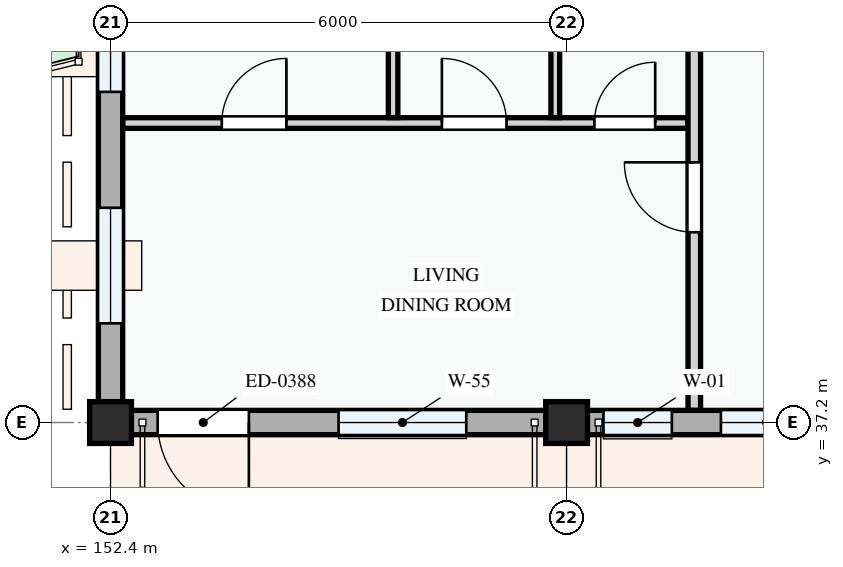
"""IFC4 building model, lengths in metres.
Left out: names, types, materials, properties, quantities, classifications, styles, units other than length and angle.
Written with IfcOpenShell. Run it as: python <this file> out.ifc"""

import sys

from ifc_helpers import new_model, si_unit, direction, frame, frame_2d, origin, origin_2d, place, context, subcontext, project, spatial, rectangle, extrude, element, fill, save


model = new_model("IFC4")
c1 = context("Model", 3, precision=1e-05, world=origin(), true_north=direction((0.0, 1.0)))
c2 = subcontext(c1, "Body", "Model", "MODEL_VIEW")
j1 = project(units=[si_unit("LENGTHUNIT", "METRE"), si_unit("PLANEANGLEUNIT", "RADIAN")], contexts=[c1])
p1 = place(None, origin())
s1 = spatial("IfcSite", under=j1, at=p1, CompositionType="ELEMENT")
p2 = place(p1, origin())
s2 = spatial("IfcBuilding", under=s1, at=p2, CompositionType="ELEMENT")
p3 = place(p2, frame((0.0, 0.0, 11.4)))
s3 = spatial("IfcBuildingStorey", under=s2, at=p3, CompositionType="ELEMENT", Elevation=11.4)
for number, where, z_axis, x_axis in (
    (1, (152.4, 37.2, 0.0), (0.0, 0.0, 1.0), (1.0, 0.0, 0.0)),
    (2, (158.4, 37.2, 0.0), (0.0, 0.0, 1.0), (1.0, 0.0, 0.0)),
):
    element("IfcColumn", number, at=place(p3, frame(where, z_axis=z_axis, x_axis=x_axis)), inside=s3, PredefinedType="COLUMN", context=c2, shape_type="SweptSolid", body=[
        extrude(rectangle(XDim=0.55, YDim=0.55, at=origin_2d()), origin(), (0.0, 0.0, 1.0), 3.3),
    ])
p4 = place(p3, frame((152.4, 43.2, 0.0), z_axis=(0.0, 0.0, 1.0), x_axis=(0.0, -1.0, 0.0)))
e3 = element("IfcWall", 3, at=p4, inside=s3, PredefinedType="STANDARD", context=c2, shape_type="SweptSolid", body=[
    extrude(rectangle(XDim=6.0, YDim=0.32, at=frame_2d((3.0, 0.0))), origin(), (0.0, 0.0, 1.0), 2.575),
])
p5 = place(p4, frame((0.6, 0.0, 0.78)))
e4 = element("IfcOpeningElement", 4, at=p5, cuts=e3, PredefinedType="OPENING", context=c2, shape_type="SweptSolid", body=[
    extrude(rectangle(XDim=1.05, YDim=1.2, at=frame_2d((0.525, 0.6))), frame((0.0, 0.17, 0.0), z_axis=(0.0, -1.0, 0.0), x_axis=(1.0, 0.0, 0.0)), (0.0, 0.0, 1.0), 0.34),
])
p6 = place(p4, frame((3.175, 0.0, 0.78)))
e5 = element("IfcOpeningElement", 5, at=p6, cuts=e3, PredefinedType="OPENING", context=c2, shape_type="SweptSolid", body=[
    extrude(rectangle(XDim=1.52, YDim=1.42, at=frame_2d((0.76, 0.71))), frame((0.0, 0.17, 0.0), z_axis=(0.0, -1.0, 0.0), x_axis=(1.0, 0.0, 0.0)), (0.0, 0.0, 1.0), 0.34),
])
p7 = place(p3, frame((152.4, 37.2, 0.0), z_axis=(0.0, 0.0, 1.0), x_axis=(1.0, 0.0, 0.0)))
e6 = element("IfcWall", 6, at=p7, inside=s3, PredefinedType="STANDARD", context=c2, shape_type="SweptSolid", body=[
    extrude(rectangle(XDim=6.0, YDim=0.32, at=frame_2d((3.0, 0.0))), origin(), (0.0, 0.0, 1.0), 2.475),
])
p8 = place(p7, frame((0.62, 0.0, 0.0)))
e7 = element("IfcOpeningElement", 7, at=p8, cuts=e6, PredefinedType="OPENING", context=c2, shape_type="SweptSolid", body=[
    extrude(rectangle(XDim=1.2, YDim=2.15, at=frame_2d((0.6, 1.075))), frame((0.0, 0.17, 0.0), z_axis=(0.0, -1.0, 0.0), x_axis=(1.0, 0.0, 0.0)), (0.0, 0.0, 1.0), 0.34),
])
p9 = place(p7, frame((3.0, 0.0, 0.78)))
e8 = element("IfcOpeningElement", 8, at=p9, cuts=e6, PredefinedType="OPENING", context=c2, shape_type="SweptSolid", body=[
    extrude(rectangle(XDim=1.68, YDim=1.46, at=frame_2d((0.84, 0.73))), frame((0.0, 0.17, 0.0), z_axis=(0.0, -1.0, 0.0), x_axis=(1.0, 0.0, 0.0)), (0.0, 0.0, 1.0), 0.34),
])
p10 = place(p3, frame((158.4, 37.2, 0.0), z_axis=(0.0, 0.0, 1.0), x_axis=(1.0, 0.0, 0.0)))
e9 = element("IfcWall", 9, at=p10, inside=s3, PredefinedType="STANDARD", context=c2, shape_type="SweptSolid", body=[
    extrude(rectangle(XDim=8.4, YDim=0.32, at=frame_2d((4.2, 0.0))), origin(), (0.0, 0.0, 1.0), 2.375),
])
p11 = place(p10, frame((3.91, 0.0, 0.0)))
e10 = element("IfcOpeningElement", 10, at=p11, cuts=e9, PredefinedType="OPENING", context=c2, shape_type="SweptSolid", body=[
    extrude(rectangle(XDim=1.25, YDim=2.2, at=frame_2d((0.625, 1.1))), frame((0.0, 0.17, 0.0), z_axis=(0.0, -1.0, 0.0), x_axis=(1.0, 0.0, 0.0)), (0.0, 0.0, 1.0), 0.34),
])
p12 = place(p10, frame((0.485, 0.0, 0.78)))
e11 = element("IfcOpeningElement", 11, at=p12, cuts=e9, PredefinedType="OPENING", context=c2, shape_type="SweptSolid", body=[
    extrude(rectangle(XDim=0.9, YDim=1.2, at=frame_2d((0.45, 0.6))), frame((0.0, 0.17, 0.0), z_axis=(0.0, -1.0, 0.0), x_axis=(1.0, 0.0, 0.0)), (0.0, 0.0, 1.0), 0.34),
])
p13 = place(p10, frame((2.03, 0.0, 0.78)))
e12 = element("IfcOpeningElement", 12, at=p13, cuts=e9, PredefinedType="OPENING", context=c2, shape_type="SweptSolid", body=[
    extrude(rectangle(XDim=1.2, YDim=1.35, at=frame_2d((0.6, 0.675))), frame((0.0, 0.17, 0.0), z_axis=(0.0, -1.0, 0.0), x_axis=(1.0, 0.0, 0.0)), (0.0, 0.0, 1.0), 0.34),
])
p14 = place(p10, frame((5.935, 0.0, 0.78)))
e13 = element("IfcOpeningElement", 13, at=p14, cuts=e9, PredefinedType="OPENING", context=c2, shape_type="SweptSolid", body=[
    extrude(rectangle(XDim=1.55, YDim=1.4, at=frame_2d((0.775, 0.7))), frame((0.0, 0.17, 0.0), z_axis=(0.0, -1.0, 0.0), x_axis=(1.0, 0.0, 0.0)), (0.0, 0.0, 1.0), 0.34),
])
p15 = place(p3, frame((152.562, 41.14, 0.0), z_axis=(0.0, 0.0, 1.0), x_axis=(1.0, 0.0, 0.0)))
e14 = element("IfcWall", 14, at=p15, inside=s3, PredefinedType="PARTITIONING", context=c2, shape_type="SweptSolid", body=[
    extrude(rectangle(XDim=7.434, YDim=0.14, at=frame_2d((3.717, 0.0))), origin(), (0.0, 0.0, 1.0), 3.0),
])
p16 = place(p15, frame((1.302, 0.0, 0.0)))
e15 = element("IfcOpeningElement", 15, at=p16, cuts=e14, PredefinedType="OPENING", context=c2, shape_type="SweptSolid", body=[
    extrude(rectangle(XDim=0.85, YDim=2.1, at=frame_2d((0.425, 1.05))), frame((0.0, 0.08, 0.0), z_axis=(0.0, -1.0, 0.0), x_axis=(1.0, 0.0, 0.0)), (0.0, 0.0, 1.0), 0.16),
])
p17 = place(p15, frame((4.198, 0.0, 0.0)))
e16 = element("IfcOpeningElement", 16, at=p17, cuts=e14, PredefinedType="OPENING", context=c2, shape_type="SweptSolid", body=[
    extrude(rectangle(XDim=0.85, YDim=2.1, at=frame_2d((0.425, 1.05))), frame((0.0, 0.08, 0.0), z_axis=(0.0, -1.0, 0.0), x_axis=(1.0, 0.0, 0.0)), (0.0, 0.0, 1.0), 0.16),
])
p18 = place(p15, frame((6.204, 0.0, 0.0)))
e17 = element("IfcOpeningElement", 17, at=p18, cuts=e14, PredefinedType="OPENING", context=c2, shape_type="SweptSolid", body=[
    extrude(rectangle(XDim=0.8, YDim=2.1, at=frame_2d((0.4, 1.05))), frame((0.0, 0.08, 0.0), z_axis=(0.0, -1.0, 0.0), x_axis=(1.0, 0.0, 0.0)), (0.0, 0.0, 1.0), 0.16),
])
p19 = place(p3, frame((156.118, 41.212, 0.0), z_axis=(0.0, 0.0, 1.0), x_axis=(0.0, 1.0, 0.0)))
e18 = element("IfcWall", 18, at=p19, inside=s3, PredefinedType="PARTITIONING", context=c2, shape_type="SweptSolid", body=[
    extrude(rectangle(XDim=3.706, YDim=0.125, at=frame_2d((1.853, 0.0))), origin(), (0.0, 0.0, 1.0), 3.0),
])
p20 = place(p3, frame((158.251, 41.212, 0.0), z_axis=(0.0, 0.0, 1.0), x_axis=(0.0, 1.0, 0.0)))
e19 = element("IfcWall", 19, at=p20, inside=s3, PredefinedType="PARTITIONING", context=c2, shape_type="SweptSolid", body=[
    extrude(rectangle(XDim=3.706, YDim=0.115, at=frame_2d((1.853, 0.0))), origin(), (0.0, 0.0, 1.0), 2.425),
])
p21 = place(p3, frame((160.08, 37.362, 0.0), z_axis=(0.0, 0.0, 1.0), x_axis=(0.0, 1.0, 0.0)))
e20 = element("IfcWall", 20, at=p21, inside=s3, PredefinedType="PARTITIONING", context=c2, shape_type="SweptSolid", body=[
    extrude(rectangle(XDim=20.378, YDim=0.165, at=frame_2d((10.189, 0.0))), origin(), (0.0, 0.0, 1.0), 3.0),
])
p22 = place(p21, frame((2.341, 0.0, 0.0)))
e21 = element("IfcOpeningElement", 21, at=p22, cuts=e20, PredefinedType="OPENING", context=c2, shape_type="SweptSolid", body=[
    extrude(rectangle(XDim=0.92, YDim=2.1, at=frame_2d((0.46, 1.05))), frame((0.0, 0.093, 0.0), z_axis=(0.0, -1.0, 0.0), x_axis=(1.0, 0.0, 0.0)), (0.0, 0.0, 1.0), 0.185),
])
p23 = place(p21, frame((9.608, 0.0, 0.0)))
e22 = element("IfcOpeningElement", 22, at=p23, cuts=e20, PredefinedType="OPENING", context=c2, shape_type="SweptSolid", body=[
    extrude(rectangle(XDim=0.92, YDim=2.1, at=frame_2d((0.46, 1.05))), frame((0.0, 0.093, 0.0), z_axis=(0.0, -1.0, 0.0), x_axis=(1.0, 0.0, 0.0)), (0.0, 0.0, 1.0), 0.185),
])
p24 = place(p5, origin())
e23 = element("IfcWindow", 23, at=p24, inside=s3, PartitioningType="SINGLE_PANEL", PredefinedType="WINDOW", context=c2, shape_type="SweptSolid", body=[
    extrude(rectangle(XDim=1.05, YDim=1.2, at=frame_2d((0.525, 0.6))), frame((0.0, 0.03, 0.0), z_axis=(0.0, -1.0, 0.0), x_axis=(1.0, 0.0, 0.0)), (0.0, 0.0, 1.0), 0.06),
])
fill(e4, e23)
p25 = place(p6, origin())
e24 = element("IfcWindow", 24, at=p25, inside=s3, PartitioningType="SINGLE_PANEL", PredefinedType="WINDOW", context=c2, shape_type="SweptSolid", body=[
    extrude(rectangle(XDim=1.52, YDim=1.42, at=frame_2d((0.76, 0.71))), frame((0.0, 0.03, 0.0), z_axis=(0.0, -1.0, 0.0), x_axis=(1.0, 0.0, 0.0)), (0.0, 0.0, 1.0), 0.06),
])
fill(e5, e24)
p26 = place(p8, frame((1.2, 0.0, 0.0), z_axis=(0.0, 0.0, 1.0), x_axis=(-1.0, 0.0, 0.0)))
e25 = element("IfcDoor", 25, at=p26, inside=s3, OperationType="SINGLE_SWING_LEFT", PredefinedType="DOOR", context=c2, shape_type="SweptSolid", body=[
    extrude(rectangle(XDim=1.2, YDim=2.15, at=frame_2d((0.6, 1.075))), frame((0.0, 0.025, 0.0), z_axis=(0.0, -1.0, 0.0), x_axis=(1.0, 0.0, 0.0)), (0.0, 0.0, 1.0), 0.05),
])
fill(e7, e25)
p27 = place(p9, origin())
e26 = element("IfcWindow", 26, at=p27, inside=s3, PartitioningType="DOUBLE_PANEL_VERTICAL", PredefinedType="WINDOW", context=c2, shape_type="SweptSolid", body=[
    extrude(rectangle(XDim=1.68, YDim=1.46, at=frame_2d((0.84, 0.73))), frame((0.0, 0.03, 0.0), z_axis=(0.0, -1.0, 0.0), x_axis=(1.0, 0.0, 0.0)), (0.0, 0.0, 1.0), 0.06),
])
fill(e8, e26)
p28 = place(p12, origin())
e27 = element("IfcWindow", 27, at=p28, inside=s3, PartitioningType="SINGLE_PANEL", PredefinedType="WINDOW", context=c2, shape_type="SweptSolid", body=[
    extrude(rectangle(XDim=0.9, YDim=1.2, at=frame_2d((0.45, 0.6))), frame((0.0, 0.03, 0.0), z_axis=(0.0, -1.0, 0.0), x_axis=(1.0, 0.0, 0.0)), (0.0, 0.0, 1.0), 0.06),
])
fill(e11, e27)
p29 = place(p13, origin())
e28 = element("IfcWindow", 28, at=p29, inside=s3, PartitioningType="SINGLE_PANEL", PredefinedType="WINDOW", context=c2, shape_type="SweptSolid", body=[
    extrude(rectangle(XDim=1.2, YDim=1.35, at=frame_2d((0.6, 0.675))), frame((0.0, 0.03, 0.0), z_axis=(0.0, -1.0, 0.0), x_axis=(1.0, 0.0, 0.0)), (0.0, 0.0, 1.0), 0.06),
])
fill(e12, e28)
p30 = place(p16, origin())
e29 = element("IfcDoor", 29, at=p30, inside=s3, OperationType="SINGLE_SWING_RIGHT", PredefinedType="DOOR", context=c2, shape_type="SweptSolid", body=[
    extrude(rectangle(XDim=0.85, YDim=2.1, at=frame_2d((0.425, 1.05))), frame((0.0, 0.025, 0.0), z_axis=(0.0, -1.0, 0.0), x_axis=(1.0, 0.0, 0.0)), (0.0, 0.0, 1.0), 0.05),
])
fill(e15, e29)
p31 = place(p17, origin())
e30 = element("IfcDoor", 30, at=p31, inside=s3, OperationType="SINGLE_SWING_LEFT", PredefinedType="DOOR", context=c2, shape_type="SweptSolid", body=[
    extrude(rectangle(XDim=0.85, YDim=2.1, at=frame_2d((0.425, 1.05))), frame((0.0, 0.025, 0.0), z_axis=(0.0, -1.0, 0.0), x_axis=(1.0, 0.0, 0.0)), (0.0, 0.0, 1.0), 0.05),
])
fill(e16, e30)
p32 = place(p18, origin())
e31 = element("IfcDoor", 31, at=p32, inside=s3, OperationType="SINGLE_SWING_RIGHT", PredefinedType="DOOR", context=c2, shape_type="SweptSolid", body=[
    extrude(rectangle(XDim=0.8, YDim=2.1, at=frame_2d((0.4, 1.05))), frame((0.0, 0.025, 0.0), z_axis=(0.0, -1.0, 0.0), x_axis=(1.0, 0.0, 0.0)), (0.0, 0.0, 1.0), 0.05),
])
fill(e17, e31)
p33 = place(p22, origin())
e32 = element("IfcDoor", 32, at=p33, inside=s3, OperationType="SINGLE_SWING_RIGHT", PredefinedType="DOOR", context=c2, shape_type="SweptSolid", body=[
    extrude(rectangle(XDim=0.92, YDim=2.1, at=frame_2d((0.46, 1.05))), frame((0.0, 0.025, 0.0), z_axis=(0.0, -1.0, 0.0), x_axis=(1.0, 0.0, 0.0)), (0.0, 0.0, 1.0), 0.05),
])
fill(e21, e32)
save(model, sys.argv[1])
